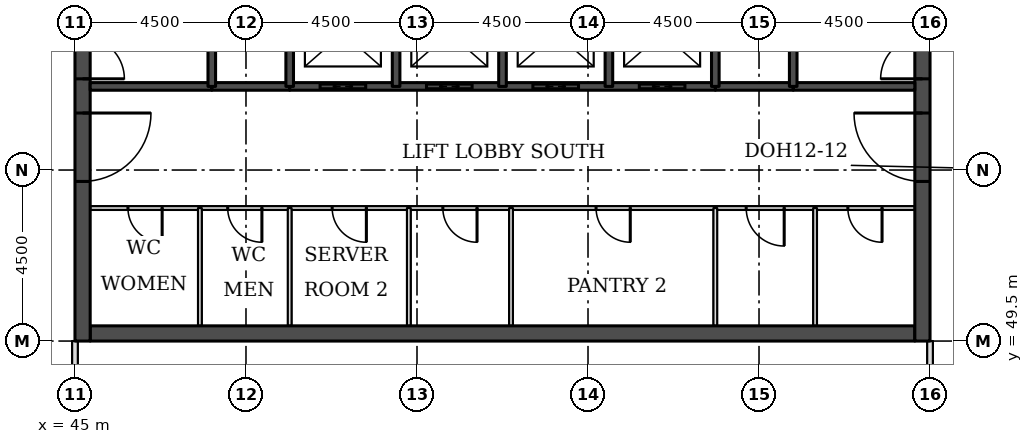
"""IFC4 building model, lengths in metres.
Left out: names, types, materials, properties, quantities, classifications, styles, units other than length and angle.
Written with IfcOpenShell. Run it as: python <this file> out.ifc"""

import sys

from ifc_helpers import new_model, si_unit, direction, frame, frame_2d, origin, place, context, subcontext, project, spatial, rectangle, extrude, element, fill, save


model = new_model("IFC4")
c1 = context("Model", 3, precision=1e-05, world=origin(), true_north=direction((0.0, 1.0)))
c2 = subcontext(c1, "Body", "Model", "MODEL_VIEW")
j1 = project(units=[si_unit("LENGTHUNIT", "METRE"), si_unit("PLANEANGLEUNIT", "RADIAN")], contexts=[c1])
p1 = place(None, origin())
s1 = spatial("IfcSite", under=j1, at=p1, CompositionType="ELEMENT")
p2 = place(p1, origin())
s2 = spatial("IfcBuilding", under=s1, at=p2, CompositionType="ELEMENT")
p3 = place(p2, frame((0.0, 0.0, 248.9)))
s3 = spatial("IfcBuildingStorey", under=s2, at=p3, CompositionType="ELEMENT", Elevation=248.9)
p4 = place(p3, frame((45.4, 49.7, 0.0), z_axis=(0.0, 0.0, 1.0), x_axis=(1.0, 0.0, 0.0)))
e1 = element("IfcWall", 1, at=p4, inside=s3, PredefinedType="SHEAR", context=c2, shape_type="SweptSolid", body=[
    extrude(rectangle(XDim=21.7, YDim=0.4, at=frame_2d((10.85, 0.0))), origin(), (0.0, 0.0, 1.0), 3.7),
])
p5 = place(p3, frame((45.2, 49.5, 0.0), z_axis=(0.0, 0.0, 1.0), x_axis=(0.0, 1.0, 0.0)))
e2 = element("IfcWall", 2, at=p5, inside=s3, PredefinedType="SHEAR", context=c2, shape_type="SweptSolid", body=[
    extrude(rectangle(XDim=22.5, YDim=0.4, at=frame_2d((11.25, 0.0))), origin(), (0.0, 0.0, 1.0), 3.7),
])
p6 = place(p5, frame((4.2, 0.0, 0.0)))
e3 = element("IfcOpeningElement", 3, at=p6, cuts=e2, PredefinedType="OPENING", context=c2, shape_type="SweptSolid", body=[
    extrude(rectangle(XDim=1.8, YDim=2.1, at=frame_2d((0.9, 1.05))), frame((0.0, 0.21, 0.0), z_axis=(0.0, -1.0, 0.0), x_axis=(1.0, 0.0, 0.0)), (0.0, 0.0, 1.0), 0.42),
])
p7 = place(p5, frame((6.9, 0.0, 0.0)))
e4 = element("IfcOpeningElement", 4, at=p7, cuts=e2, PredefinedType="OPENING", context=c2, shape_type="SweptSolid", body=[
    extrude(rectangle(XDim=1.1, YDim=2.1, at=frame_2d((0.55, 1.05))), frame((0.0, 0.21, 0.0), z_axis=(0.0, -1.0, 0.0), x_axis=(1.0, 0.0, 0.0)), (0.0, 0.0, 1.0), 0.42),
])
p8 = place(p5, frame((13.6, 0.0, 0.0)))
e5 = element("IfcOpeningElement", 5, at=p8, cuts=e2, PredefinedType="OPENING", context=c2, shape_type="SweptSolid", body=[
    extrude(rectangle(XDim=1.1, YDim=2.1, at=frame_2d((0.55, 1.05))), frame((0.0, 0.21, 0.0), z_axis=(0.0, -1.0, 0.0), x_axis=(1.0, 0.0, 0.0)), (0.0, 0.0, 1.0), 0.42),
])
p9 = place(p5, frame((16.5, 0.0, 0.0)))
e6 = element("IfcOpeningElement", 6, at=p9, cuts=e2, PredefinedType="OPENING", context=c2, shape_type="SweptSolid", body=[
    extrude(rectangle(XDim=1.8, YDim=2.1, at=frame_2d((0.9, 1.05))), frame((0.0, 0.21, 0.0), z_axis=(0.0, -1.0, 0.0), x_axis=(1.0, 0.0, 0.0)), (0.0, 0.0, 1.0), 0.42),
])
p10 = place(p3, frame((67.3, 49.5, 0.0), z_axis=(0.0, 0.0, 1.0), x_axis=(0.0, 1.0, 0.0)))
e7 = element("IfcWall", 7, at=p10, inside=s3, PredefinedType="SHEAR", context=c2, shape_type="SweptSolid", body=[
    extrude(rectangle(XDim=22.5, YDim=0.4, at=frame_2d((11.25, 0.0))), origin(), (0.0, 0.0, 1.0), 3.7),
])
p11 = place(p10, frame((4.2, 0.0, 0.0)))
e8 = element("IfcOpeningElement", 8, at=p11, cuts=e7, PredefinedType="OPENING", context=c2, shape_type="SweptSolid", body=[
    extrude(rectangle(XDim=1.8, YDim=2.1, at=frame_2d((0.9, 1.05))), frame((0.0, 0.21, 0.0), z_axis=(0.0, -1.0, 0.0), x_axis=(1.0, 0.0, 0.0)), (0.0, 0.0, 1.0), 0.42),
])
p12 = place(p10, frame((6.9, 0.0, 0.0)))
e9 = element("IfcOpeningElement", 9, at=p12, cuts=e7, PredefinedType="OPENING", context=c2, shape_type="SweptSolid", body=[
    extrude(rectangle(XDim=1.1, YDim=2.1, at=frame_2d((0.55, 1.05))), frame((0.0, 0.21, 0.0), z_axis=(0.0, -1.0, 0.0), x_axis=(1.0, 0.0, 0.0)), (0.0, 0.0, 1.0), 0.42),
])
p13 = place(p10, frame((13.6, 0.0, 0.0)))
e10 = element("IfcOpeningElement", 10, at=p13, cuts=e7, PredefinedType="OPENING", context=c2, shape_type="SweptSolid", body=[
    extrude(rectangle(XDim=1.1, YDim=2.1, at=frame_2d((0.55, 1.05))), frame((0.0, 0.21, 0.0), z_axis=(0.0, -1.0, 0.0), x_axis=(1.0, 0.0, 0.0)), (0.0, 0.0, 1.0), 0.42),
])
p14 = place(p10, frame((16.5, 0.0, 0.0)))
e11 = element("IfcOpeningElement", 11, at=p14, cuts=e7, PredefinedType="OPENING", context=c2, shape_type="SweptSolid", body=[
    extrude(rectangle(XDim=1.8, YDim=2.1, at=frame_2d((0.9, 1.05))), frame((0.0, 0.21, 0.0), z_axis=(0.0, -1.0, 0.0), x_axis=(1.0, 0.0, 0.0)), (0.0, 0.0, 1.0), 0.42),
])
p15 = place(p3, frame((67.5, 40.05, 0.0), z_axis=(0.0, 0.0, 1.0), x_axis=(0.0, 1.0, 0.0)))
e12 = element("IfcWall", 12, at=p15, inside=s3, PredefinedType="PARTITIONING", context=c2, shape_type="SweptSolid", body=[
    extrude(rectangle(XDim=9.45, YDim=0.15, at=frame_2d((4.725, 0.0))), origin(), (0.0, 0.0, 1.0), 3.022),
])
p16 = place(p3, frame((45.0, 48.0, 0.0), z_axis=(0.0, 0.0, 1.0), x_axis=(0.0, 1.0, 0.0)))
e13 = element("IfcWall", 13, at=p16, inside=s3, PredefinedType="PARTITIONING", context=c2, shape_type="SweptSolid", body=[
    extrude(rectangle(XDim=1.5, YDim=0.15, at=frame_2d((0.75, 0.0))), origin(), (0.0, 0.0, 1.0), 3.022),
])
p17 = place(p3, frame((45.4, 53.0, 0.0), z_axis=(0.0, 0.0, 1.0), x_axis=(1.0, 0.0, 0.0)))
e14 = element("IfcWall", 14, at=p17, inside=s3, PredefinedType="PARTITIONING", context=c2, shape_type="SweptSolid", body=[
    extrude(rectangle(XDim=21.7, YDim=0.1, at=frame_2d((10.85, 0.0))), origin(), (0.0, 0.0, 1.0), 3.55),
])
p18 = place(p17, frame((19.938, 0.0, 0.0)))
e15 = element("IfcOpeningElement", 15, at=p18, cuts=e14, PredefinedType="OPENING", context=c2, shape_type="SweptSolid", body=[
    extrude(rectangle(XDim=0.9, YDim=2.1, at=frame_2d((0.45, 1.05))), frame((0.0, 0.06, 0.0), z_axis=(0.0, -1.0, 0.0), x_axis=(1.0, 0.0, 0.0)), (0.0, 0.0, 1.0), 0.12),
])
p19 = place(p17, frame((17.262, 0.0, 0.0)))
e16 = element("IfcOpeningElement", 16, at=p19, cuts=e14, PredefinedType="OPENING", context=c2, shape_type="SweptSolid", body=[
    extrude(rectangle(XDim=1.0, YDim=2.1, at=frame_2d((0.5, 1.05))), frame((0.0, 0.06, 0.0), z_axis=(0.0, -1.0, 0.0), x_axis=(1.0, 0.0, 0.0)), (0.0, 0.0, 1.0), 0.12),
])
p20 = place(p17, frame((0.994, 0.0, 0.0)))
e17 = element("IfcOpeningElement", 17, at=p20, cuts=e14, PredefinedType="OPENING", context=c2, shape_type="SweptSolid", body=[
    extrude(rectangle(XDim=0.9, YDim=2.1, at=frame_2d((0.45, 1.05))), frame((0.0, 0.06, 0.0), z_axis=(0.0, -1.0, 0.0), x_axis=(1.0, 0.0, 0.0)), (0.0, 0.0, 1.0), 0.12),
])
p21 = place(p17, frame((3.619, 0.0, 0.0)))
e18 = element("IfcOpeningElement", 18, at=p21, cuts=e14, PredefinedType="OPENING", context=c2, shape_type="SweptSolid", body=[
    extrude(rectangle(XDim=0.9, YDim=2.1, at=frame_2d((0.45, 1.05))), frame((0.0, 0.06, 0.0), z_axis=(0.0, -1.0, 0.0), x_axis=(1.0, 0.0, 0.0)), (0.0, 0.0, 1.0), 0.12),
])
p22 = place(p17, frame((6.368, 0.0, 0.0)))
e19 = element("IfcOpeningElement", 19, at=p22, cuts=e14, PredefinedType="OPENING", context=c2, shape_type="SweptSolid", body=[
    extrude(rectangle(XDim=0.9, YDim=2.1, at=frame_2d((0.45, 1.05))), frame((0.0, 0.06, 0.0), z_axis=(0.0, -1.0, 0.0), x_axis=(1.0, 0.0, 0.0)), (0.0, 0.0, 1.0), 0.12),
])
p23 = place(p17, frame((9.28, 0.0, 0.0)))
e20 = element("IfcOpeningElement", 20, at=p23, cuts=e14, PredefinedType="OPENING", context=c2, shape_type="SweptSolid", body=[
    extrude(rectangle(XDim=0.9, YDim=2.1, at=frame_2d((0.45, 1.05))), frame((0.0, 0.06, 0.0), z_axis=(0.0, -1.0, 0.0), x_axis=(1.0, 0.0, 0.0)), (0.0, 0.0, 1.0), 0.12),
])
p24 = place(p17, frame((13.312, 0.0, 0.0)))
e21 = element("IfcOpeningElement", 21, at=p24, cuts=e14, PredefinedType="OPENING", context=c2, shape_type="SweptSolid", body=[
    extrude(rectangle(XDim=0.9, YDim=2.1, at=frame_2d((0.45, 1.05))), frame((0.0, 0.06, 0.0), z_axis=(0.0, -1.0, 0.0), x_axis=(1.0, 0.0, 0.0)), (0.0, 0.0, 1.0), 0.12),
])
for number, where, z_axis, x_axis in (
    (22, (48.6, 56.2, 0.0), (0.0, 0.0, 1.0), (1.0, 0.0, 0.0)),
    (23, (61.85, 56.2, 0.0), (0.0, 0.0, 1.0), (1.0, 0.0, 0.0)),
):
    element("IfcWall", number, at=place(p3, frame(where, z_axis=z_axis, x_axis=x_axis)), inside=s3, PredefinedType="SOLIDWALL", context=c2, shape_type="SweptSolid", body=[
        extrude(rectangle(XDim=2.05, YDim=0.2, at=frame_2d((1.025, 0.0))), origin(), (0.0, 0.0, 1.0), 3.55),
    ])
p25 = place(p3, frame((45.4, 56.2, 0.0), z_axis=(0.0, 0.0, 1.0), x_axis=(1.0, 0.0, 0.0)))
e24 = element("IfcWall", 24, at=p25, inside=s3, PredefinedType="SOLIDWALL", context=c2, shape_type="SweptSolid", body=[
    extrude(rectangle(XDim=3.2, YDim=0.2, at=frame_2d((1.6, 0.0))), origin(), (0.0, 0.0, 1.0), 3.55),
])
p26 = place(p3, frame((50.65, 56.2, 0.0), z_axis=(0.0, 0.0, 1.0), x_axis=(1.0, 0.0, 0.0)))
e25 = element("IfcWall", 25, at=p26, inside=s3, PredefinedType="SOLIDWALL", context=c2, shape_type="SweptSolid", body=[
    extrude(rectangle(XDim=11.2, YDim=0.2, at=frame_2d((5.6, 0.0))), origin(), (0.0, 0.0, 1.0), 3.55),
])
p27 = place(p26, frame((0.8, 0.0, 0.0)))
e26 = element("IfcOpeningElement", 26, at=p27, cuts=e25, PredefinedType="OPENING", context=c2, shape_type="SweptSolid", body=[
    extrude(rectangle(XDim=1.2, YDim=2.1, at=frame_2d((0.6, 1.05))), frame((0.0, 0.11, 0.0), z_axis=(0.0, -1.0, 0.0), x_axis=(1.0, 0.0, 0.0)), (0.0, 0.0, 1.0), 0.22),
])
p28 = place(p26, frame((3.6, 0.0, 0.0)))
e27 = element("IfcOpeningElement", 27, at=p28, cuts=e25, PredefinedType="OPENING", context=c2, shape_type="SweptSolid", body=[
    extrude(rectangle(XDim=1.2, YDim=2.1, at=frame_2d((0.6, 1.05))), frame((0.0, 0.11, 0.0), z_axis=(0.0, -1.0, 0.0), x_axis=(1.0, 0.0, 0.0)), (0.0, 0.0, 1.0), 0.22),
])
p29 = place(p26, frame((6.4, 0.0, 0.0)))
e28 = element("IfcOpeningElement", 28, at=p29, cuts=e25, PredefinedType="OPENING", context=c2, shape_type="SweptSolid", body=[
    extrude(rectangle(XDim=1.2, YDim=2.1, at=frame_2d((0.6, 1.05))), frame((0.0, 0.11, 0.0), z_axis=(0.0, -1.0, 0.0), x_axis=(1.0, 0.0, 0.0)), (0.0, 0.0, 1.0), 0.22),
])
p30 = place(p26, frame((9.2, 0.0, 0.0)))
e29 = element("IfcOpeningElement", 29, at=p30, cuts=e25, PredefinedType="OPENING", context=c2, shape_type="SweptSolid", body=[
    extrude(rectangle(XDim=1.2, YDim=2.1, at=frame_2d((0.6, 1.05))), frame((0.0, 0.11, 0.0), z_axis=(0.0, -1.0, 0.0), x_axis=(1.0, 0.0, 0.0)), (0.0, 0.0, 1.0), 0.22),
])
p31 = place(p3, frame((63.9, 56.2, 0.0), z_axis=(0.0, 0.0, 1.0), x_axis=(1.0, 0.0, 0.0)))
e30 = element("IfcWall", 30, at=p31, inside=s3, PredefinedType="SOLIDWALL", context=c2, shape_type="SweptSolid", body=[
    extrude(rectangle(XDim=3.2, YDim=0.2, at=frame_2d((1.6, 0.0))), origin(), (0.0, 0.0, 1.0), 3.55),
])
p32 = place(p3, frame((48.288, 49.9, 0.0), z_axis=(0.0, 0.0, 1.0), x_axis=(0.0, 1.0, 0.0)))
e31 = element("IfcWall", 31, at=p32, inside=s3, PredefinedType="PARTITIONING", context=c2, shape_type="SweptSolid", body=[
    extrude(rectangle(XDim=3.1, YDim=0.1, at=frame_2d((1.55, 0.0))), origin(), (0.0, 0.0, 1.0), 3.55),
])
p33 = place(p3, frame((48.6, 56.2, 0.0), z_axis=(0.0, 0.0, 1.0), x_axis=(0.0, 1.0, 0.0)))
e32 = element("IfcWall", 32, at=p33, inside=s3, PredefinedType="SOLIDWALL", context=c2, shape_type="SweptSolid", body=[
    extrude(rectangle(XDim=5.8, YDim=0.2, at=frame_2d((2.9, 0.0))), origin(), (0.0, 0.0, 1.0), 3.55),
])
p34 = place(p3, frame((50.65, 49.9, 0.0), z_axis=(0.0, 0.0, 1.0), x_axis=(0.0, 1.0, 0.0)))
e33 = element("IfcWall", 33, at=p34, inside=s3, PredefinedType="PARTITIONING", context=c2, shape_type="SweptSolid", body=[
    extrude(rectangle(XDim=3.1, YDim=0.1, at=frame_2d((1.55, 0.0))), origin(), (0.0, 0.0, 1.0), 3.55),
])
for number, where, z_axis, x_axis in (
    (34, (50.65, 56.2, 0.0), (0.0, 0.0, 1.0), (0.0, 1.0, 0.0)),
    (35, (53.45, 56.2, 0.0), (0.0, 0.0, 1.0), (0.0, 1.0, 0.0)),
):
    element("IfcWall", number, at=place(p3, frame(where, z_axis=z_axis, x_axis=x_axis)), inside=s3, PredefinedType="SOLIDWALL", context=c2, shape_type="SweptSolid", body=[
        extrude(rectangle(XDim=2.8, YDim=0.2, at=frame_2d((1.4, 0.0))), origin(), (0.0, 0.0, 1.0), 3.55),
    ])
p35 = place(p3, frame((53.786, 49.9, 0.0), z_axis=(0.0, 0.0, 1.0), x_axis=(0.0, 1.0, 0.0)))
e36 = element("IfcWall", 36, at=p35, inside=s3, PredefinedType="PARTITIONING", context=c2, shape_type="SweptSolid", body=[
    extrude(rectangle(XDim=3.1, YDim=0.1, at=frame_2d((1.55, 0.0))), origin(), (0.0, 0.0, 1.0), 3.55),
])
p36 = place(p3, frame((56.25, 56.2, 0.0), z_axis=(0.0, 0.0, 1.0), x_axis=(0.0, 1.0, 0.0)))
e37 = element("IfcWall", 37, at=p36, inside=s3, PredefinedType="SOLIDWALL", context=c2, shape_type="SweptSolid", body=[
    extrude(rectangle(XDim=2.8, YDim=0.2, at=frame_2d((1.4, 0.0))), origin(), (0.0, 0.0, 1.0), 3.55),
])
p37 = place(p3, frame((56.474, 49.9, 0.0), z_axis=(0.0, 0.0, 1.0), x_axis=(0.0, 1.0, 0.0)))
e38 = element("IfcWall", 38, at=p37, inside=s3, PredefinedType="PARTITIONING", context=c2, shape_type="SweptSolid", body=[
    extrude(rectangle(XDim=3.1, YDim=0.1, at=frame_2d((1.55, 0.0))), origin(), (0.0, 0.0, 1.0), 3.55),
])
p38 = place(p3, frame((59.05, 56.2, 0.0), z_axis=(0.0, 0.0, 1.0), x_axis=(0.0, 1.0, 0.0)))
e39 = element("IfcWall", 39, at=p38, inside=s3, PredefinedType="SOLIDWALL", context=c2, shape_type="SweptSolid", body=[
    extrude(rectangle(XDim=2.8, YDim=0.2, at=frame_2d((1.4, 0.0))), origin(), (0.0, 0.0, 1.0), 3.55),
])
p39 = place(p3, frame((61.85, 49.9, 0.0), z_axis=(0.0, 0.0, 1.0), x_axis=(0.0, 1.0, 0.0)))
e40 = element("IfcWall", 40, at=p39, inside=s3, PredefinedType="PARTITIONING", context=c2, shape_type="SweptSolid", body=[
    extrude(rectangle(XDim=3.1, YDim=0.1, at=frame_2d((1.55, 0.0))), origin(), (0.0, 0.0, 1.0), 3.55),
])
p40 = place(p3, frame((61.85, 56.2, 0.0), z_axis=(0.0, 0.0, 1.0), x_axis=(0.0, 1.0, 0.0)))
e41 = element("IfcWall", 41, at=p40, inside=s3, PredefinedType="SOLIDWALL", context=c2, shape_type="SweptSolid", body=[
    extrude(rectangle(XDim=2.8, YDim=0.2, at=frame_2d((1.4, 0.0))), origin(), (0.0, 0.0, 1.0), 3.55),
])
p41 = place(p3, frame((63.9, 56.2, 0.0), z_axis=(0.0, 0.0, 1.0), x_axis=(0.0, 1.0, 0.0)))
e42 = element("IfcWall", 42, at=p41, inside=s3, PredefinedType="SOLIDWALL", context=c2, shape_type="SweptSolid", body=[
    extrude(rectangle(XDim=5.8, YDim=0.2, at=frame_2d((2.9, 0.0))), origin(), (0.0, 0.0, 1.0), 3.55),
])
p42 = place(p3, frame((64.475, 49.9, 0.0), z_axis=(0.0, 0.0, 1.0), x_axis=(0.0, 1.0, 0.0)))
e43 = element("IfcWall", 43, at=p42, inside=s3, PredefinedType="PARTITIONING", context=c2, shape_type="SweptSolid", body=[
    extrude(rectangle(XDim=3.1, YDim=0.1, at=frame_2d((1.55, 0.0))), origin(), (0.0, 0.0, 1.0), 3.55),
])
p43 = place(p27, origin())
e44 = element("IfcDoor", 44, at=p43, inside=s3, OperationType="DOUBLE_DOOR_SLIDING", PredefinedType="DOOR", context=c2, shape_type="SweptSolid", body=[
    extrude(rectangle(XDim=1.2, YDim=2.1, at=frame_2d((0.6, 1.05))), frame((0.0, 0.025, 0.0), z_axis=(0.0, -1.0, 0.0), x_axis=(1.0, 0.0, 0.0)), (0.0, 0.0, 1.0), 0.05),
])
fill(e26, e44)
p44 = place(p28, origin())
e45 = element("IfcDoor", 45, at=p44, inside=s3, OperationType="DOUBLE_DOOR_SLIDING", PredefinedType="DOOR", context=c2, shape_type="SweptSolid", body=[
    extrude(rectangle(XDim=1.2, YDim=2.1, at=frame_2d((0.6, 1.05))), frame((0.0, 0.025, 0.0), z_axis=(0.0, -1.0, 0.0), x_axis=(1.0, 0.0, 0.0)), (0.0, 0.0, 1.0), 0.05),
])
fill(e27, e45)
p45 = place(p29, origin())
e46 = element("IfcDoor", 46, at=p45, inside=s3, OperationType="DOUBLE_DOOR_SLIDING", PredefinedType="DOOR", context=c2, shape_type="SweptSolid", body=[
    extrude(rectangle(XDim=1.2, YDim=2.1, at=frame_2d((0.6, 1.05))), frame((0.0, 0.025, 0.0), z_axis=(0.0, -1.0, 0.0), x_axis=(1.0, 0.0, 0.0)), (0.0, 0.0, 1.0), 0.05),
])
fill(e28, e46)
p46 = place(p30, origin())
e47 = element("IfcDoor", 47, at=p46, inside=s3, OperationType="DOUBLE_DOOR_SLIDING", PredefinedType="DOOR", context=c2, shape_type="SweptSolid", body=[
    extrude(rectangle(XDim=1.2, YDim=2.1, at=frame_2d((0.6, 1.05))), frame((0.0, 0.025, 0.0), z_axis=(0.0, -1.0, 0.0), x_axis=(1.0, 0.0, 0.0)), (0.0, 0.0, 1.0), 0.05),
])
fill(e29, e47)
p47 = place(p6, frame((1.8, 0.0, 0.0), z_axis=(0.0, 0.0, 1.0), x_axis=(-1.0, 0.0, 0.0)))
e48 = element("IfcDoor", 48, at=p47, inside=s3, OperationType="SINGLE_SWING_LEFT", PredefinedType="DOOR", context=c2, shape_type="SweptSolid", body=[
    extrude(rectangle(XDim=1.8, YDim=2.1, at=frame_2d((0.9, 1.05))), frame((0.0, 0.025, 0.0), z_axis=(0.0, -1.0, 0.0), x_axis=(1.0, 0.0, 0.0)), (0.0, 0.0, 1.0), 0.05),
])
fill(e3, e48)
p48 = place(p7, frame((1.1, 0.0, 0.0), z_axis=(0.0, 0.0, 1.0), x_axis=(-1.0, 0.0, 0.0)))
e49 = element("IfcDoor", 49, at=p48, inside=s3, OperationType="SINGLE_SWING_RIGHT", PredefinedType="DOOR", context=c2, shape_type="SweptSolid", body=[
    extrude(rectangle(XDim=1.1, YDim=2.1, at=frame_2d((0.55, 1.05))), frame((0.0, 0.025, 0.0), z_axis=(0.0, -1.0, 0.0), x_axis=(1.0, 0.0, 0.0)), (0.0, 0.0, 1.0), 0.05),
])
fill(e4, e49)
p49 = place(p11, origin())
e50 = element("IfcDoor", 50, at=p49, inside=s3, OperationType="SINGLE_SWING_RIGHT", PredefinedType="DOOR", context=c2, shape_type="SweptSolid", body=[
    extrude(rectangle(XDim=1.8, YDim=2.1, at=frame_2d((0.9, 1.05))), frame((0.0, 0.025, 0.0), z_axis=(0.0, -1.0, 0.0), x_axis=(1.0, 0.0, 0.0)), (0.0, 0.0, 1.0), 0.05),
])
fill(e8, e50)
p50 = place(p12, origin())
e51 = element("IfcDoor", 51, at=p50, inside=s3, OperationType="SINGLE_SWING_LEFT", PredefinedType="DOOR", context=c2, shape_type="SweptSolid", body=[
    extrude(rectangle(XDim=1.1, YDim=2.1, at=frame_2d((0.55, 1.05))), frame((0.0, 0.025, 0.0), z_axis=(0.0, -1.0, 0.0), x_axis=(1.0, 0.0, 0.0)), (0.0, 0.0, 1.0), 0.05),
])
fill(e9, e51)
p51 = place(p18, frame((0.9, 0.0, 0.0), z_axis=(0.0, 0.0, 1.0), x_axis=(-1.0, 0.0, 0.0)))
e52 = element("IfcDoor", 52, at=p51, inside=s3, OperationType="SINGLE_SWING_LEFT", PredefinedType="DOOR", context=c2, shape_type="SweptSolid", body=[
    extrude(rectangle(XDim=0.9, YDim=2.1, at=frame_2d((0.45, 1.05))), frame((0.0, 0.025, 0.0), z_axis=(0.0, -1.0, 0.0), x_axis=(1.0, 0.0, 0.0)), (0.0, 0.0, 1.0), 0.05),
])
fill(e15, e52)
p52 = place(p19, frame((1.0, 0.0, 0.0), z_axis=(0.0, 0.0, 1.0), x_axis=(-1.0, 0.0, 0.0)))
e53 = element("IfcDoor", 53, at=p52, inside=s3, OperationType="SINGLE_SWING_LEFT", PredefinedType="DOOR", context=c2, shape_type="SweptSolid", body=[
    extrude(rectangle(XDim=1.0, YDim=2.1, at=frame_2d((0.5, 1.05))), frame((0.0, 0.025, 0.0), z_axis=(0.0, -1.0, 0.0), x_axis=(1.0, 0.0, 0.0)), (0.0, 0.0, 1.0), 0.05),
])
fill(e16, e53)
p53 = place(p20, frame((0.9, 0.0, 0.0), z_axis=(0.0, 0.0, 1.0), x_axis=(-1.0, 0.0, 0.0)))
e54 = element("IfcDoor", 54, at=p53, inside=s3, OperationType="SINGLE_SWING_LEFT", PredefinedType="DOOR", context=c2, shape_type="SweptSolid", body=[
    extrude(rectangle(XDim=0.9, YDim=2.1, at=frame_2d((0.45, 1.05))), frame((0.0, 0.025, 0.0), z_axis=(0.0, -1.0, 0.0), x_axis=(1.0, 0.0, 0.0)), (0.0, 0.0, 1.0), 0.05),
])
fill(e17, e54)
p54 = place(p21, frame((0.9, 0.0, 0.0), z_axis=(0.0, 0.0, 1.0), x_axis=(-1.0, 0.0, 0.0)))
e55 = element("IfcDoor", 55, at=p54, inside=s3, OperationType="SINGLE_SWING_LEFT", PredefinedType="DOOR", context=c2, shape_type="SweptSolid", body=[
    extrude(rectangle(XDim=0.9, YDim=2.1, at=frame_2d((0.45, 1.05))), frame((0.0, 0.025, 0.0), z_axis=(0.0, -1.0, 0.0), x_axis=(1.0, 0.0, 0.0)), (0.0, 0.0, 1.0), 0.05),
])
fill(e18, e55)
p55 = place(p22, frame((0.9, 0.0, 0.0), z_axis=(0.0, 0.0, 1.0), x_axis=(-1.0, 0.0, 0.0)))
e56 = element("IfcDoor", 56, at=p55, inside=s3, OperationType="SINGLE_SWING_LEFT", PredefinedType="DOOR", context=c2, shape_type="SweptSolid", body=[
    extrude(rectangle(XDim=0.9, YDim=2.1, at=frame_2d((0.45, 1.05))), frame((0.0, 0.025, 0.0), z_axis=(0.0, -1.0, 0.0), x_axis=(1.0, 0.0, 0.0)), (0.0, 0.0, 1.0), 0.05),
])
fill(e19, e56)
p56 = place(p23, frame((0.9, 0.0, 0.0), z_axis=(0.0, 0.0, 1.0), x_axis=(-1.0, 0.0, 0.0)))
e57 = element("IfcDoor", 57, at=p56, inside=s3, OperationType="SINGLE_SWING_LEFT", PredefinedType="DOOR", context=c2, shape_type="SweptSolid", body=[
    extrude(rectangle(XDim=0.9, YDim=2.1, at=frame_2d((0.45, 1.05))), frame((0.0, 0.025, 0.0), z_axis=(0.0, -1.0, 0.0), x_axis=(1.0, 0.0, 0.0)), (0.0, 0.0, 1.0), 0.05),
])
fill(e20, e57)
p57 = place(p24, frame((0.9, 0.0, 0.0), z_axis=(0.0, 0.0, 1.0), x_axis=(-1.0, 0.0, 0.0)))
e58 = element("IfcDoor", 58, at=p57, inside=s3, OperationType="SINGLE_SWING_LEFT", PredefinedType="DOOR", context=c2, shape_type="SweptSolid", body=[
    extrude(rectangle(XDim=0.9, YDim=2.1, at=frame_2d((0.45, 1.05))), frame((0.0, 0.025, 0.0), z_axis=(0.0, -1.0, 0.0), x_axis=(1.0, 0.0, 0.0)), (0.0, 0.0, 1.0), 0.05),
])
fill(e21, e58)
save(model, sys.argv[1])
